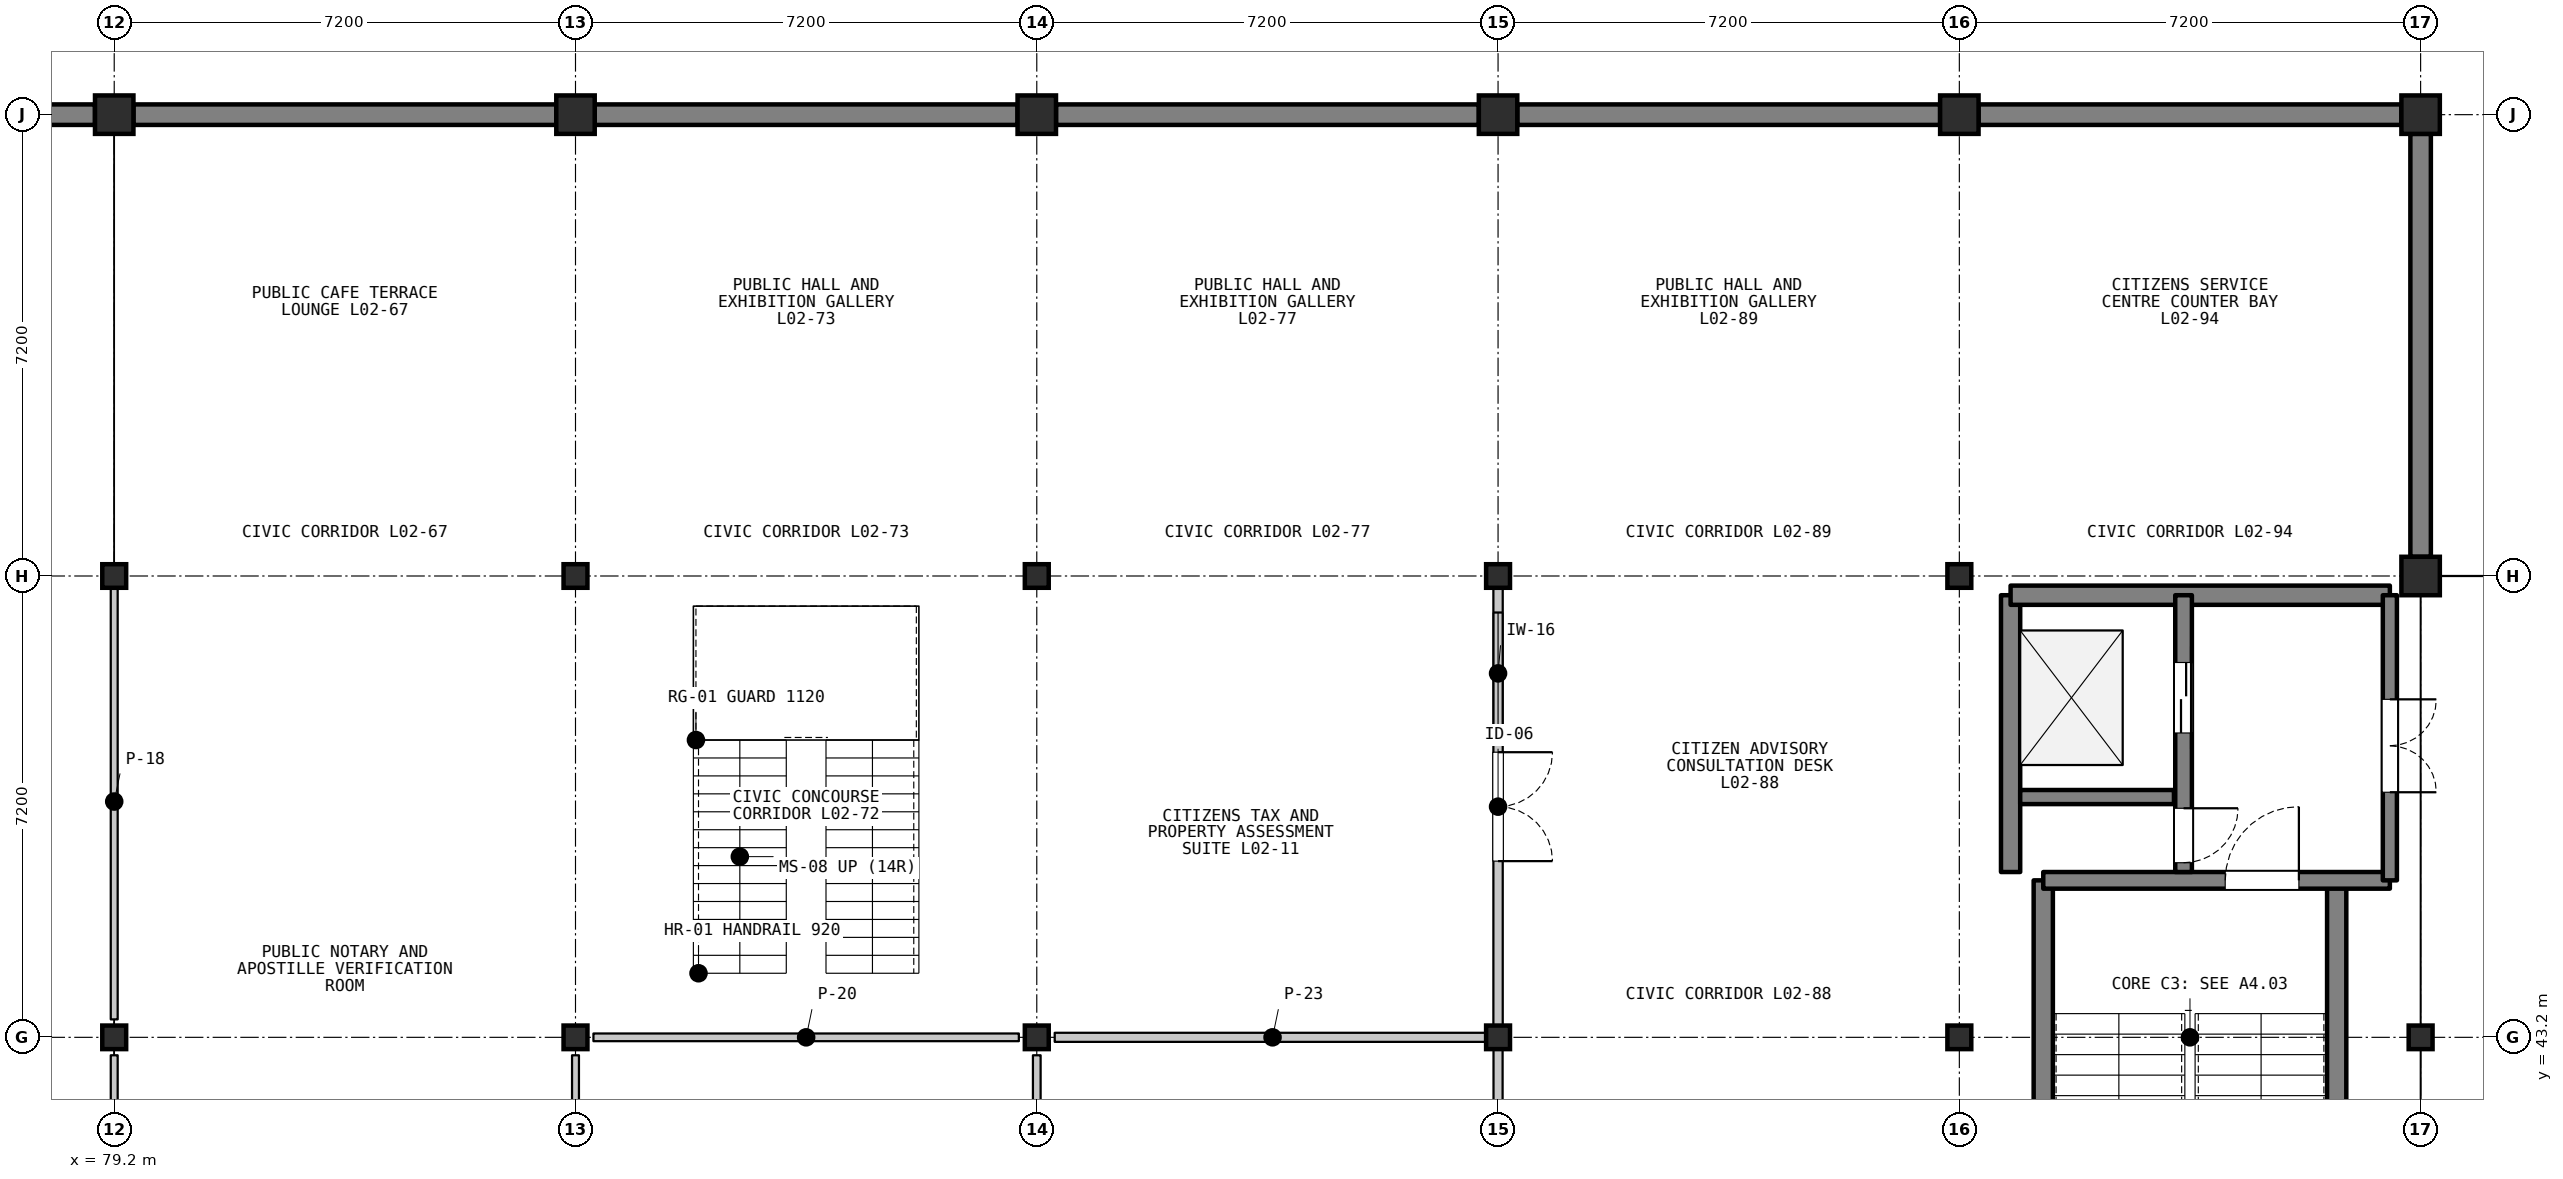
"""IFC4 building model, lengths in metres.
Left out: names, types, materials, properties, quantities, classifications, styles, units other than length and angle.
Written with IfcOpenShell. Run it as: python <this file> out.ifc"""

import sys

from ifc_helpers import new_model, si_unit, direction, frame, frame_2d, origin, origin_2d, place, context, subcontext, project, spatial, rectangle, i_section, extrude, element, fill, save


model = new_model("IFC4")
c1 = context("Model", 3, precision=1e-05, world=origin(), true_north=direction((0.0, 1.0)))
c2 = subcontext(c1, "Body", "Model", "MODEL_VIEW")
j1 = project(units=[si_unit("LENGTHUNIT", "METRE"), si_unit("PLANEANGLEUNIT", "RADIAN")], contexts=[c1])
p1 = place(None, origin())
s1 = spatial("IfcSite", under=j1, at=p1, CompositionType="ELEMENT")
p2 = place(p1, origin())
s2 = spatial("IfcBuilding", under=s1, at=p2, CompositionType="ELEMENT")
p3 = place(p2, frame((0.0, 0.0, 5.4)))
s3 = spatial("IfcBuildingStorey", under=s2, at=p3, CompositionType="ELEMENT", Elevation=5.4)
for number, where, z_axis, x_axis in (
    (1, (79.2, 43.2, 0.0), (0.0, 0.0, 1.0), (1.0, 0.0, 0.0)),
    (2, (79.2, 50.4, 0.0), (0.0, 0.0, 1.0), (1.0, 0.0, 0.0)),
):
    element("IfcColumn", number, at=place(p3, frame(where, z_axis=z_axis, x_axis=x_axis)), inside=s3, PredefinedType="COLUMN", context=c2, shape_type="SweptSolid", body=[
        extrude(i_section(OverallWidth=0.373, OverallDepth=0.368, WebThickness=0.015, FlangeThickness=0.024, FilletRadius=0.015, at=origin_2d()), origin(), (0.0, 0.0, 1.0), 4.5),
    ])
p4 = place(p3, frame((79.2, 57.6, 0.0), z_axis=(0.0, 0.0, 1.0), x_axis=(1.0, 0.0, 0.0)))
e3 = element("IfcColumn", 3, at=p4, inside=s3, PredefinedType="COLUMN", context=c2, shape_type="SweptSolid", body=[
    extrude(rectangle(XDim=0.6, YDim=0.6, at=origin_2d()), origin(), (0.0, 0.0, 1.0), 4.5),
])
for number, where, z_axis, x_axis in (
    (4, (86.4, 43.2, 0.0), (0.0, 0.0, 1.0), (1.0, 0.0, 0.0)),
    (5, (86.4, 50.4, 0.0), (0.0, 0.0, 1.0), (1.0, 0.0, 0.0)),
):
    element("IfcColumn", number, at=place(p3, frame(where, z_axis=z_axis, x_axis=x_axis)), inside=s3, PredefinedType="COLUMN", context=c2, shape_type="SweptSolid", body=[
        extrude(i_section(OverallWidth=0.373, OverallDepth=0.368, WebThickness=0.015, FlangeThickness=0.024, FilletRadius=0.015, at=origin_2d()), origin(), (0.0, 0.0, 1.0), 4.5),
    ])
p5 = place(p3, frame((86.4, 57.6, 0.0), z_axis=(0.0, 0.0, 1.0), x_axis=(1.0, 0.0, 0.0)))
e6 = element("IfcColumn", 6, at=p5, inside=s3, PredefinedType="COLUMN", context=c2, shape_type="SweptSolid", body=[
    extrude(rectangle(XDim=0.6, YDim=0.6, at=origin_2d()), origin(), (0.0, 0.0, 1.0), 4.5),
])
for number, where, z_axis, x_axis in (
    (7, (93.6, 43.2, 0.0), (0.0, 0.0, 1.0), (1.0, 0.0, 0.0)),
    (8, (93.6, 50.4, 0.0), (0.0, 0.0, 1.0), (1.0, 0.0, 0.0)),
):
    element("IfcColumn", number, at=place(p3, frame(where, z_axis=z_axis, x_axis=x_axis)), inside=s3, PredefinedType="COLUMN", context=c2, shape_type="SweptSolid", body=[
        extrude(i_section(OverallWidth=0.373, OverallDepth=0.368, WebThickness=0.015, FlangeThickness=0.024, FilletRadius=0.015, at=origin_2d()), origin(), (0.0, 0.0, 1.0), 4.5),
    ])
p6 = place(p3, frame((93.6, 57.6, 0.0), z_axis=(0.0, 0.0, 1.0), x_axis=(1.0, 0.0, 0.0)))
e9 = element("IfcColumn", 9, at=p6, inside=s3, PredefinedType="COLUMN", context=c2, shape_type="SweptSolid", body=[
    extrude(rectangle(XDim=0.6, YDim=0.6, at=origin_2d()), origin(), (0.0, 0.0, 1.0), 4.5),
])
for number, where, z_axis, x_axis in (
    (10, (100.8, 43.2, 0.0), (0.0, 0.0, 1.0), (1.0, 0.0, 0.0)),
    (11, (100.8, 50.4, 0.0), (0.0, 0.0, 1.0), (1.0, 0.0, 0.0)),
):
    element("IfcColumn", number, at=place(p3, frame(where, z_axis=z_axis, x_axis=x_axis)), inside=s3, PredefinedType="COLUMN", context=c2, shape_type="SweptSolid", body=[
        extrude(i_section(OverallWidth=0.373, OverallDepth=0.368, WebThickness=0.015, FlangeThickness=0.024, FilletRadius=0.015, at=origin_2d()), origin(), (0.0, 0.0, 1.0), 4.5),
    ])
p7 = place(p3, frame((100.8, 57.6, 0.0), z_axis=(0.0, 0.0, 1.0), x_axis=(1.0, 0.0, 0.0)))
e12 = element("IfcColumn", 12, at=p7, inside=s3, PredefinedType="COLUMN", context=c2, shape_type="SweptSolid", body=[
    extrude(rectangle(XDim=0.6, YDim=0.6, at=origin_2d()), origin(), (0.0, 0.0, 1.0), 4.5),
])
for number, where, z_axis, x_axis in (
    (13, (108.0, 43.2, 0.0), (0.0, 0.0, 1.0), (1.0, 0.0, 0.0)),
    (14, (108.0, 50.4, 0.0), (0.0, 0.0, 1.0), (1.0, 0.0, 0.0)),
):
    element("IfcColumn", number, at=place(p3, frame(where, z_axis=z_axis, x_axis=x_axis)), inside=s3, PredefinedType="COLUMN", context=c2, shape_type="SweptSolid", body=[
        extrude(i_section(OverallWidth=0.373, OverallDepth=0.368, WebThickness=0.015, FlangeThickness=0.024, FilletRadius=0.015, at=origin_2d()), origin(), (0.0, 0.0, 1.0), 4.5),
    ])
p8 = place(p3, frame((108.0, 57.6, 0.0), z_axis=(0.0, 0.0, 1.0), x_axis=(1.0, 0.0, 0.0)))
e15 = element("IfcColumn", 15, at=p8, inside=s3, PredefinedType="COLUMN", context=c2, shape_type="SweptSolid", body=[
    extrude(rectangle(XDim=0.6, YDim=0.6, at=origin_2d()), origin(), (0.0, 0.0, 1.0), 4.5),
])
p9 = place(p3, frame((115.2, 43.2, 0.0), z_axis=(0.0, 0.0, 1.0), x_axis=(1.0, 0.0, 0.0)))
e16 = element("IfcColumn", 16, at=p9, inside=s3, PredefinedType="COLUMN", context=c2, shape_type="SweptSolid", body=[
    extrude(i_section(OverallWidth=0.373, OverallDepth=0.368, WebThickness=0.015, FlangeThickness=0.024, FilletRadius=0.015, at=origin_2d()), origin(), (0.0, 0.0, 1.0), 4.5),
])
for number, where, z_axis, x_axis in (
    (17, (115.2, 50.4, 0.0), (0.0, 0.0, 1.0), (1.0, 0.0, 0.0)),
    (18, (115.2, 57.6, 0.0), (0.0, 0.0, 1.0), (1.0, 0.0, 0.0)),
):
    element("IfcColumn", number, at=place(p3, frame(where, z_axis=z_axis, x_axis=x_axis)), inside=s3, PredefinedType="COLUMN", context=c2, shape_type="SweptSolid", body=[
        extrude(rectangle(XDim=0.6, YDim=0.6, at=origin_2d()), origin(), (0.0, 0.0, 1.0), 4.5),
    ])
p10 = place(p3, frame((72.3, 57.6, 0.0), z_axis=(0.0, 0.0, 1.0), x_axis=(1.0, 0.0, 0.0)))
e19 = element("IfcWall", 19, at=p10, inside=s3, PredefinedType="SOLIDWALL", context=c2, shape_type="SweptSolid", body=[
    extrude(rectangle(XDim=6.6, YDim=0.32, at=frame_2d((3.3, 0.0))), origin(), (0.0, 0.0, 1.0), 3.698),
])
p11 = place(p10, frame((0.884, 0.0, 0.95)))
e20 = element("IfcOpeningElement", 20, at=p11, cuts=e19, PredefinedType="OPENING", context=c2, shape_type="SweptSolid", body=[
    extrude(rectangle(XDim=1.4, YDim=2.1, at=frame_2d((0.7, 1.05))), frame((0.0, 0.17, 0.0), z_axis=(0.0, -1.0, 0.0), x_axis=(1.0, 0.0, 0.0)), (0.0, 0.0, 1.0), 0.34),
])
p12 = place(p10, frame((4.316, 0.0, 0.95)))
e21 = element("IfcOpeningElement", 21, at=p12, cuts=e19, PredefinedType="OPENING", context=c2, shape_type="SweptSolid", body=[
    extrude(rectangle(XDim=1.4, YDim=2.1, at=frame_2d((0.7, 1.05))), frame((0.0, 0.17, 0.0), z_axis=(0.0, -1.0, 0.0), x_axis=(1.0, 0.0, 0.0)), (0.0, 0.0, 1.0), 0.34),
])
for number, where, z_axis, x_axis in (
    (22, (79.5, 57.6, 0.0), (0.0, 0.0, 1.0), (1.0, 0.0, 0.0)),
    (23, (86.7, 57.6, 0.0), (0.0, 0.0, 1.0), (1.0, 0.0, 0.0)),
    (24, (93.9, 57.6, 0.0), (0.0, 0.0, 1.0), (1.0, 0.0, 0.0)),
):
    element("IfcWall", number, at=place(p3, frame(where, z_axis=z_axis, x_axis=x_axis)), inside=s3, PredefinedType="SOLIDWALL", context=c2, shape_type="SweptSolid", body=[
        extrude(rectangle(XDim=6.6, YDim=0.32, at=frame_2d((3.3, 0.0))), origin(), (0.0, 0.0, 1.0), 3.698),
    ])
for number, where, z_axis, x_axis in (
    (25, (101.1, 57.6, 0.0), (0.0, 0.0, 1.0), (1.0, 0.0, 0.0)),
    (26, (108.3, 57.6, 0.0), (0.0, 0.0, 1.0), (1.0, 0.0, 0.0)),
):
    element("IfcWall", number, at=place(p3, frame(where, z_axis=z_axis, x_axis=x_axis)), inside=s3, PredefinedType="SOLIDWALL", context=c2, shape_type="SweptSolid", body=[
        extrude(rectangle(XDim=6.6, YDim=0.32, at=frame_2d((3.3, 0.0))), origin(), (0.0, 0.0, 1.0), 3.698),
    ])
p13 = place(p3, frame((115.2, 57.3, 0.0), z_axis=(0.0, 0.0, 1.0), x_axis=(0.0, -1.0, 0.0)))
e27 = element("IfcWall", 27, at=p13, inside=s3, PredefinedType="SOLIDWALL", context=c2, shape_type="SweptSolid", body=[
    extrude(rectangle(XDim=6.6, YDim=0.32, at=frame_2d((3.3, 0.0))), origin(), (0.0, 0.0, 1.0), 3.767),
])
for number, where, z_axis, x_axis in (
    (28, (109.31, 36.35, 0.0), (0.0, 0.0, 1.0), (0.0, 1.0, 0.0)),
    (29, (113.89, 36.35, 0.0), (0.0, 0.0, 1.0), (0.0, 1.0, 0.0)),
):
    element("IfcWall", number, at=place(p3, frame(where, z_axis=z_axis, x_axis=x_axis)), inside=s3, PredefinedType="SHEAR", context=c2, shape_type="SweptSolid", body=[
        extrude(rectangle(XDim=9.3, YDim=0.3, at=frame_2d((4.65, 0.0))), origin(), (0.0, 0.0, 1.0), 4.3),
    ])
p14 = place(p3, frame((109.31, 45.65, 0.0), z_axis=(0.0, 0.0, 1.0), x_axis=(1.0, 0.0, 0.0)))
e30 = element("IfcWall", 30, at=p14, inside=s3, PredefinedType="SHEAR", context=c2, shape_type="SweptSolid", body=[
    extrude(rectangle(XDim=5.41, YDim=0.26, at=frame_2d((2.705, 0.0))), origin(), (0.0, 0.0, 1.0), 4.3),
])
p15 = place(p14, frame((2.84, 0.0, 0.0)))
e31 = element("IfcOpeningElement", 31, at=p15, cuts=e30, PredefinedType="OPENING", context=c2, shape_type="SweptSolid", body=[
    extrude(rectangle(XDim=1.15, YDim=2.15, at=frame_2d((0.575, 1.075))), frame((0.0, 0.14, 0.0), z_axis=(0.0, -1.0, 0.0), x_axis=(1.0, 0.0, 0.0)), (0.0, 0.0, 1.0), 0.28),
])
p16 = place(p3, frame((108.8, 45.78, 0.0), z_axis=(0.0, 0.0, 1.0), x_axis=(0.0, 1.0, 0.0)))
e32 = element("IfcWall", 32, at=p16, inside=s3, PredefinedType="SHEAR", context=c2, shape_type="SweptSolid", body=[
    extrude(rectangle(XDim=4.32, YDim=0.3, at=frame_2d((2.16, 0.0))), origin(), (0.0, 0.0, 1.0), 4.3),
])
p17 = place(p3, frame((108.8, 50.1, 0.0), z_axis=(0.0, 0.0, 1.0), x_axis=(1.0, 0.0, 0.0)))
e33 = element("IfcWall", 33, at=p17, inside=s3, PredefinedType="SHEAR", context=c2, shape_type="SweptSolid", body=[
    extrude(rectangle(XDim=5.92, YDim=0.3, at=frame_2d((2.96, 0.0))), origin(), (0.0, 0.0, 1.0), 4.3),
])
p18 = place(p3, frame((108.95, 46.95, 0.0), z_axis=(0.0, 0.0, 1.0), x_axis=(1.0, 0.0, 0.0)))
e34 = element("IfcWall", 34, at=p18, inside=s3, PredefinedType="SHEAR", context=c2, shape_type="SweptSolid", body=[
    extrude(rectangle(XDim=2.4, YDim=0.22, at=frame_2d((1.2, 0.0))), origin(), (0.0, 0.0, 1.0), 4.3),
])
p19 = place(p3, frame((111.5, 50.1, 0.0), z_axis=(0.0, 0.0, 1.0), x_axis=(0.0, -1.0, 0.0)))
e35 = element("IfcWall", 35, at=p19, inside=s3, PredefinedType="SHEAR", context=c2, shape_type="SweptSolid", body=[
    extrude(rectangle(XDim=4.32, YDim=0.26, at=frame_2d((2.16, 0.0))), origin(), (0.0, 0.0, 1.0), 4.3),
])
p20 = place(p19, frame((1.05, 0.0, 0.0)))
e36 = element("IfcOpeningElement", 36, at=p20, cuts=e35, PredefinedType="OPENING", context=c2, shape_type="SweptSolid", body=[
    extrude(rectangle(XDim=1.1, YDim=2.15, at=frame_2d((0.55, 1.075))), frame((0.0, 0.14, 0.0), z_axis=(0.0, -1.0, 0.0), x_axis=(1.0, 0.0, 0.0)), (0.0, 0.0, 1.0), 0.28),
])
p21 = place(p19, frame((3.325, 0.0, 0.0)))
e37 = element("IfcOpeningElement", 37, at=p21, cuts=e35, PredefinedType="OPENING", context=c2, shape_type="SweptSolid", body=[
    extrude(rectangle(XDim=0.85, YDim=2.05, at=frame_2d((0.425, 1.025))), frame((0.0, 0.14, 0.0), z_axis=(0.0, -1.0, 0.0), x_axis=(1.0, 0.0, 0.0)), (0.0, 0.0, 1.0), 0.28),
])
p22 = place(p3, frame((114.72, 50.1, 0.0), z_axis=(0.0, 0.0, 1.0), x_axis=(0.0, -1.0, 0.0)))
e38 = element("IfcWall", 38, at=p22, inside=s3, PredefinedType="SHEAR", context=c2, shape_type="SweptSolid", body=[
    extrude(rectangle(XDim=4.45, YDim=0.22, at=frame_2d((2.225, 0.0))), origin(), (0.0, 0.0, 1.0), 4.3),
])
p23 = place(p22, frame((1.625, 0.0, 0.0)))
e39 = element("IfcOpeningElement", 39, at=p23, cuts=e38, PredefinedType="OPENING", context=c2, shape_type="SweptSolid", body=[
    extrude(rectangle(XDim=1.45, YDim=2.2, at=frame_2d((0.725, 1.1))), frame((0.0, 0.12, 0.0), z_axis=(0.0, -1.0, 0.0), x_axis=(1.0, 0.0, 0.0)), (0.0, 0.0, 1.0), 0.24),
])
for number, where, z_axis, x_axis in (
    (40, (79.2, 36.12, 0.0), (0.0, 0.0, 1.0), (0.0, 1.0, 0.0)),
    (41, (86.4, 42.92, 0.0), (0.0, 0.0, 1.0), (0.0, -1.0, 0.0)),
):
    element("IfcWall", number, at=place(p3, frame(where, z_axis=z_axis, x_axis=x_axis)), inside=s3, PredefinedType="PARTITIONING", context=c2, shape_type="SweptSolid", body=[
        extrude(rectangle(XDim=6.8, YDim=0.108, at=frame_2d((3.4, 0.0))), origin(), (0.0, 0.0, 1.0), 3.688),
    ])
p24 = place(p3, frame((79.2, 43.48, 0.0), z_axis=(0.0, 0.0, 1.0), x_axis=(0.0, 1.0, 0.0)))
e42 = element("IfcWall", 42, at=p24, inside=s3, PredefinedType="PARTITIONING", context=c2, shape_type="SweptSolid", body=[
    extrude(rectangle(XDim=6.8, YDim=0.108, at=frame_2d((3.4, 0.0))), origin(), (0.0, 0.0, 1.0), 3.688),
])
p25 = place(p3, frame((86.68, 43.2, 0.0), z_axis=(0.0, 0.0, 1.0), x_axis=(1.0, 0.0, 0.0)))
e43 = element("IfcWall", 43, at=p25, inside=s3, PredefinedType="PARTITIONING", context=c2, shape_type="SweptSolid", body=[
    extrude(rectangle(XDim=6.64, YDim=0.12, at=frame_2d((3.32, 0.0))), origin(), (0.0, 0.0, 1.0), 3.688),
])
p26 = place(p3, frame((93.6, 42.92, 0.0), z_axis=(0.0, 0.0, 1.0), x_axis=(0.0, -1.0, 0.0)))
e44 = element("IfcWall", 44, at=p26, inside=s3, PredefinedType="PARTITIONING", context=c2, shape_type="SweptSolid", body=[
    extrude(rectangle(XDim=6.8, YDim=0.12, at=frame_2d((3.4, 0.0))), origin(), (0.0, 0.0, 1.0), 3.688),
])
p27 = place(p3, frame((93.88, 43.2, 0.0), z_axis=(0.0, 0.0, 1.0), x_axis=(1.0, 0.0, 0.0)))
e45 = element("IfcWall", 45, at=p27, inside=s3, PredefinedType="PARTITIONING", context=c2, shape_type="SweptSolid", body=[
    extrude(rectangle(XDim=6.8, YDim=0.142, at=frame_2d((3.4, 0.0))), origin(), (0.0, 0.0, 1.0), 3.688),
])
p28 = place(p3, frame((100.8, 43.08, 0.0), z_axis=(0.0, 0.0, 1.0), x_axis=(0.0, -1.0, 0.0)))
e46 = element("IfcWall", 46, at=p28, inside=s3, PredefinedType="PARTITIONING", context=c2, shape_type="SweptSolid", body=[
    extrude(rectangle(XDim=6.96, YDim=0.142, at=frame_2d((3.48, 0.0))), origin(), (0.0, 0.0, 1.0), 3.688),
])
p29 = place(p3, frame((100.8, 50.28, 0.0), z_axis=(0.0, 0.0, 1.0), x_axis=(0.0, -1.0, 0.0)))
e47 = element("IfcWall", 47, at=p29, inside=s3, PredefinedType="PARTITIONING", context=c2, shape_type="SweptSolid", body=[
    extrude(rectangle(XDim=6.96, YDim=0.146, at=frame_2d((3.48, 0.0))), origin(), (0.0, 0.0, 1.0), 3.688),
])
p30 = place(p29, frame((2.63, 0.0, 0.0)))
e48 = element("IfcOpeningElement", 48, at=p30, cuts=e47, PredefinedType="OPENING", context=c2, shape_type="SweptSolid", body=[
    extrude(rectangle(XDim=1.7, YDim=2.35, at=frame_2d((0.85, 1.175))), frame((0.0, 0.083, 0.0), z_axis=(0.0, -1.0, 0.0), x_axis=(1.0, 0.0, 0.0)), (0.0, 0.0, 1.0), 0.166),
])
p31 = place(p29, frame((0.45, 0.0, 1.05)))
e49 = element("IfcOpeningElement", 49, at=p31, cuts=e47, PredefinedType="OPENING", context=c2, shape_type="SweptSolid", body=[
    extrude(rectangle(XDim=1.9, YDim=1.22, at=frame_2d((0.95, 0.61))), frame((0.0, 0.083, 0.0), z_axis=(0.0, -1.0, 0.0), x_axis=(1.0, 0.0, 0.0)), (0.0, 0.0, 1.0), 0.166),
])
p32 = place(p15, origin())
e50 = element("IfcDoor", 50, at=p32, inside=s3, OperationType="SINGLE_SWING_RIGHT", PredefinedType="DOOR", context=c2, shape_type="SweptSolid", body=[
    extrude(rectangle(XDim=1.15, YDim=2.15, at=frame_2d((0.575, 1.075))), frame((0.0, 0.025, 0.0), z_axis=(0.0, -1.0, 0.0), x_axis=(1.0, 0.0, 0.0)), (0.0, 0.0, 1.0), 0.05),
])
fill(e31, e50)
p33 = place(p20, origin())
e51 = element("IfcDoor", 51, at=p33, inside=s3, OperationType="DOUBLE_DOOR_SLIDING", PredefinedType="DOOR", context=c2, shape_type="SweptSolid", body=[
    extrude(rectangle(XDim=1.1, YDim=2.15, at=frame_2d((0.55, 1.075))), frame((0.0, 0.025, 0.0), z_axis=(0.0, -1.0, 0.0), x_axis=(1.0, 0.0, 0.0)), (0.0, 0.0, 1.0), 0.05),
])
fill(e36, e51)
p34 = place(p21, origin())
e52 = element("IfcDoor", 52, at=p34, inside=s3, OperationType="SINGLE_SWING_LEFT", PredefinedType="DOOR", context=c2, shape_type="SweptSolid", body=[
    extrude(rectangle(XDim=0.85, YDim=2.05, at=frame_2d((0.425, 1.025))), frame((0.0, 0.025, 0.0), z_axis=(0.0, -1.0, 0.0), x_axis=(1.0, 0.0, 0.0)), (0.0, 0.0, 1.0), 0.05),
])
fill(e37, e52)
p35 = place(p23, origin())
e53 = element("IfcDoor", 53, at=p35, inside=s3, OperationType="DOUBLE_DOOR_SINGLE_SWING", PredefinedType="DOOR", context=c2, shape_type="SweptSolid", body=[
    extrude(rectangle(XDim=1.45, YDim=2.2, at=frame_2d((0.725, 1.1))), frame((0.0, 0.025, 0.0), z_axis=(0.0, -1.0, 0.0), x_axis=(1.0, 0.0, 0.0)), (0.0, 0.0, 1.0), 0.05),
])
fill(e39, e53)
p36 = place(p30, origin())
e54 = element("IfcDoor", 54, at=p36, inside=s3, OperationType="DOUBLE_DOOR_SINGLE_SWING", PredefinedType="DOOR", context=c2, shape_type="SweptSolid", body=[
    extrude(rectangle(XDim=1.7, YDim=2.35, at=frame_2d((0.85, 1.175))), frame((0.0, 0.025, 0.0), z_axis=(0.0, -1.0, 0.0), x_axis=(1.0, 0.0, 0.0)), (0.0, 0.0, 1.0), 0.05),
])
fill(e48, e54)
p37 = place(p31, origin())
e55 = element("IfcWindow", 55, at=p37, inside=s3, PartitioningType="SINGLE_PANEL", PredefinedType="WINDOW", context=c2, shape_type="SweptSolid", body=[
    extrude(rectangle(XDim=1.9, YDim=1.22, at=frame_2d((0.95, 0.61))), frame((0.0, 0.03, 0.0), z_axis=(0.0, -1.0, 0.0), x_axis=(1.0, 0.0, 0.0)), (0.0, 0.0, 1.0), 0.06),
])
fill(e49, e55)
save(model, sys.argv[1])
